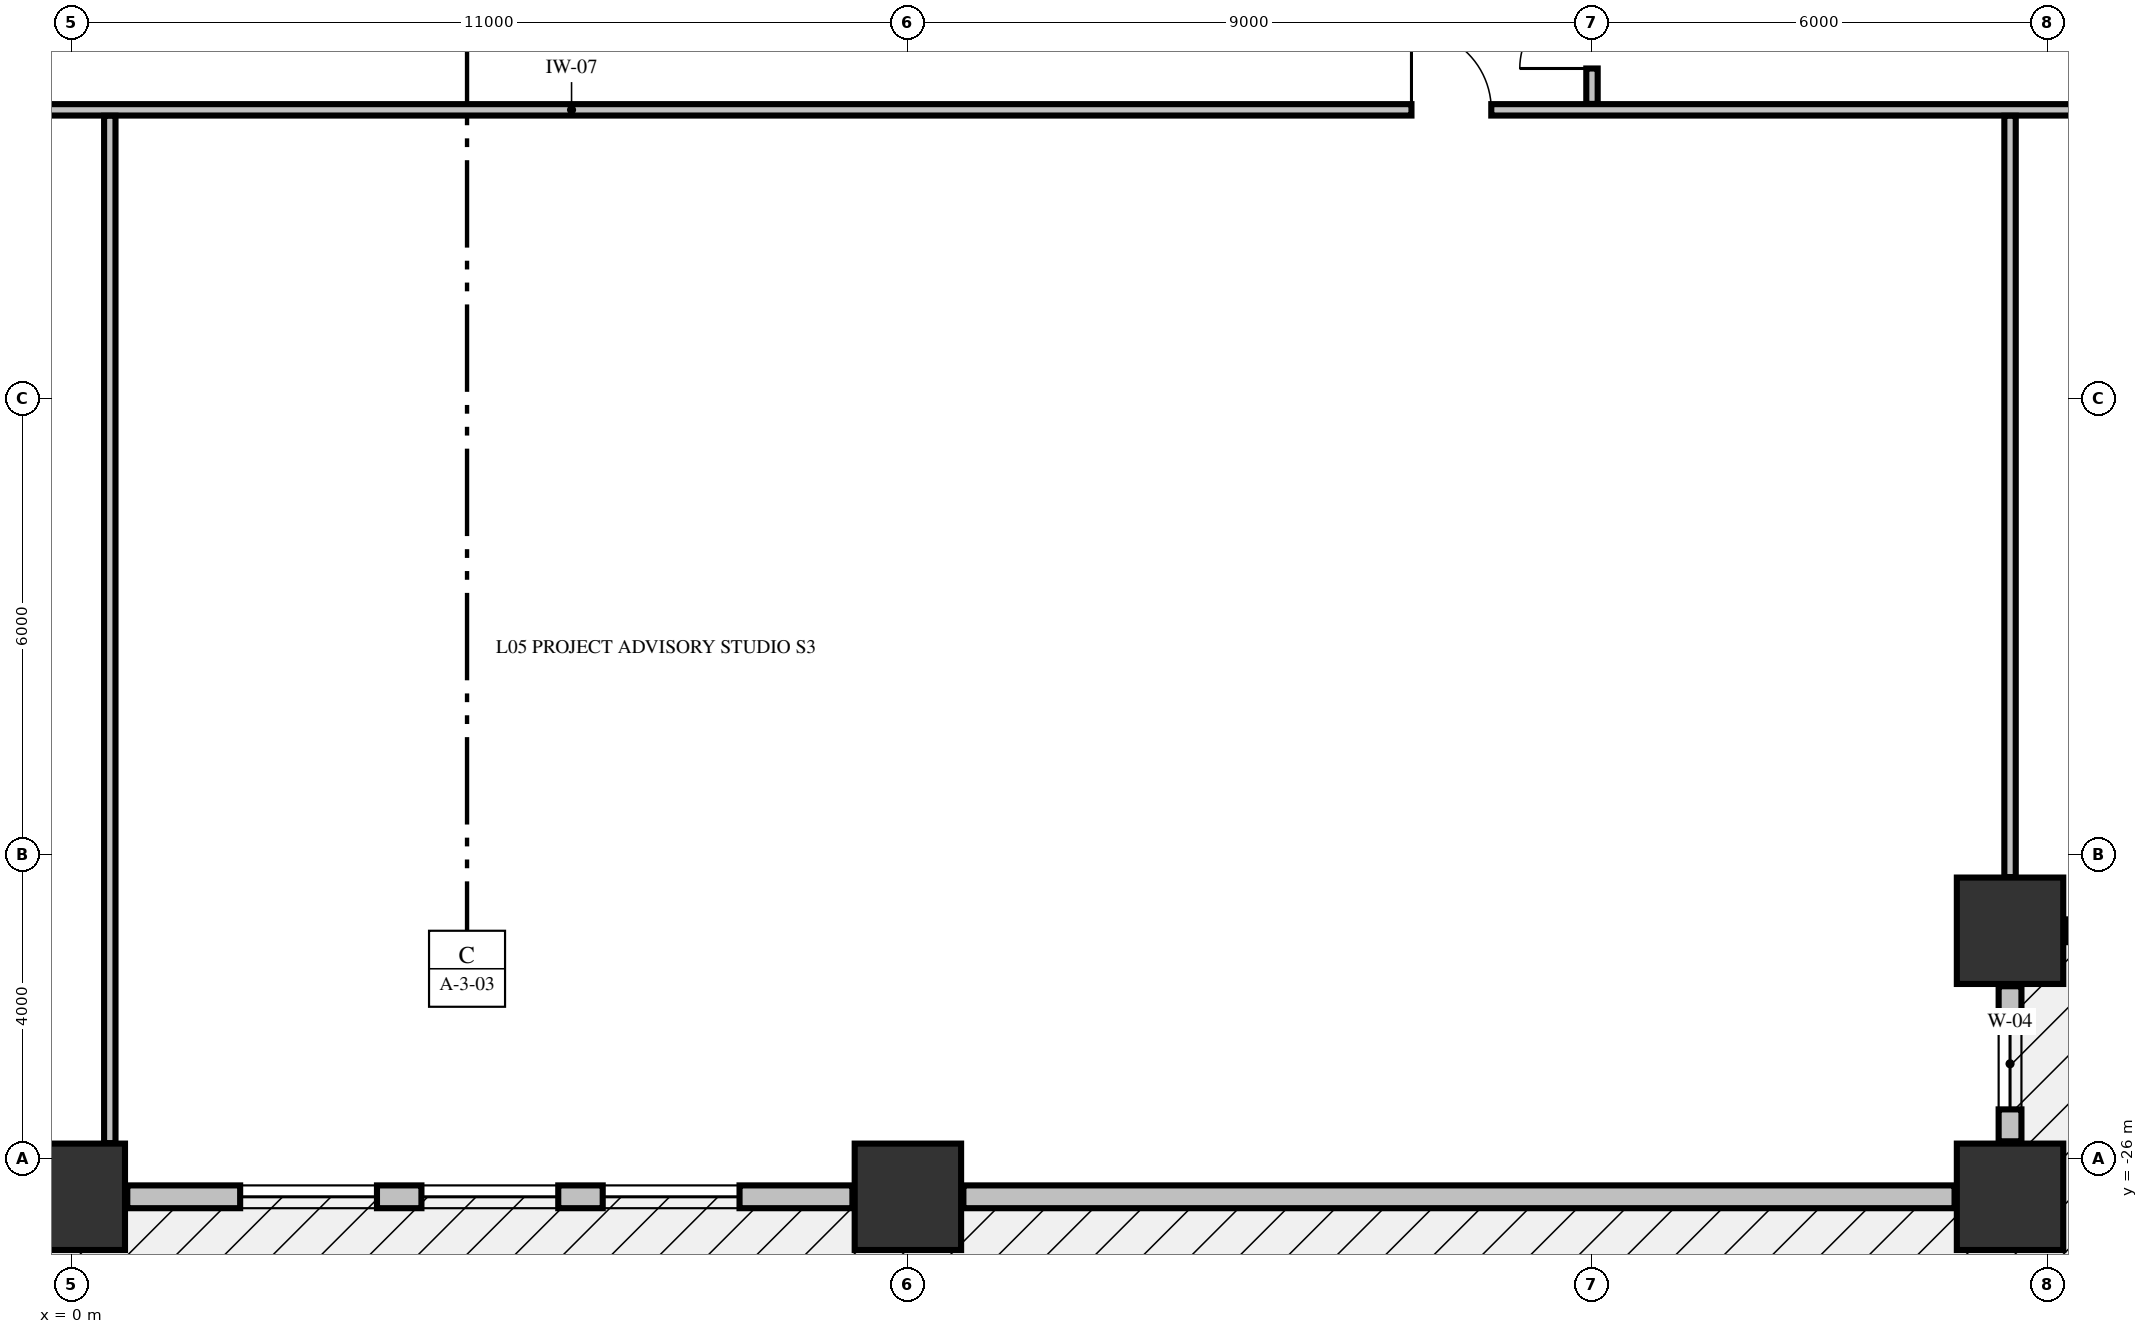
"""IFC4 building model, lengths in metres.
Left out: names, types, materials, properties, quantities, classifications, styles, units other than length and angle.
Written with IfcOpenShell. Run it as: python <this file> out.ifc"""

import sys

from ifc_helpers import new_model, si_unit, direction, frame, frame_2d, origin, origin_2d, place, context, subcontext, project, spatial, rectangle, extrude, element, fill, save


model = new_model("IFC4")
c1 = context("Model", 3, precision=1e-05, world=origin(), true_north=direction((0.0, 1.0)))
c2 = subcontext(c1, "Body", "Model", "MODEL_VIEW")
j1 = project(units=[si_unit("LENGTHUNIT", "METRE"), si_unit("PLANEANGLEUNIT", "RADIAN")], contexts=[c1])
p1 = place(None, origin())
s1 = spatial("IfcSite", under=j1, at=p1, CompositionType="ELEMENT")
p2 = place(p1, origin())
s2 = spatial("IfcBuilding", under=s1, at=p2, CompositionType="ELEMENT")
p3 = place(p2, frame((0.0, 0.0, 27.2)))
s3 = spatial("IfcBuildingStorey", under=s2, at=p3, CompositionType="ELEMENT", Elevation=27.2)
for number, where, z_axis, x_axis in (
    (1, (0.0, -26.5, -0.45), (0.0, 0.0, 1.0), (1.0, 0.0, 0.0)),
    (2, (11.0, -26.5, -0.45), (0.0, 0.0, 1.0), (1.0, 0.0, 0.0)),
    (3, (25.5, -26.5, -0.45), (0.0, 0.0, 1.0), (1.0, 0.0, 0.0)),
    (4, (25.5, -23.0, -0.45), (0.0, 0.0, 1.0), (1.0, 0.0, 0.0)),
):
    element("IfcColumn", number, at=place(p3, frame(where, z_axis=z_axis, x_axis=x_axis)), inside=s3, PredefinedType="COLUMN", context=c2, shape_type="SweptSolid", body=[
        extrude(rectangle(XDim=1.4, YDim=1.4, at=origin_2d()), origin(), (0.0, 0.0, 1.0), 3.77),
    ])
p4 = place(p3, frame((25.5, -25.77, 0.0), z_axis=(0.0, 0.0, 1.0), x_axis=(0.0, 1.0, 0.0)))
e5 = element("IfcWall", 5, at=p4, inside=s3, PredefinedType="STANDARD", context=c2, shape_type="SweptSolid", body=[
    extrude(rectangle(XDim=2.04, YDim=0.3, at=frame_2d((1.02, 0.0))), origin(), (0.0, 0.0, 1.0), 2.712),
])
p5 = place(p4, frame((0.42, 0.0, 0.82)))
e6 = element("IfcOpeningElement", 6, at=p5, cuts=e5, PredefinedType="OPENING", context=c2, shape_type="SweptSolid", body=[
    extrude(rectangle(XDim=1.2, YDim=1.65, at=frame_2d((0.6, 0.825))), frame((0.0, 0.16, 0.0), z_axis=(0.0, -1.0, 0.0), x_axis=(1.0, 0.0, 0.0)), (0.0, 0.0, 1.0), 0.32),
])
p6 = place(p3, frame((26.23, -23.0, 0.0), z_axis=(0.0, 0.0, 1.0), x_axis=(1.0, 0.0, 0.0)))
e7 = element("IfcWall", 7, at=p6, inside=s3, PredefinedType="STANDARD", context=c2, shape_type="SweptSolid", body=[
    extrude(rectangle(XDim=2.04, YDim=0.3, at=frame_2d((1.02, 0.0))), origin(), (0.0, 0.0, 1.0), 2.712),
])
p7 = place(p6, frame((0.42, 0.0, 0.82)))
e8 = element("IfcOpeningElement", 8, at=p7, cuts=e7, PredefinedType="OPENING", context=c2, shape_type="SweptSolid", body=[
    extrude(rectangle(XDim=1.2, YDim=1.65, at=frame_2d((0.6, 0.825))), frame((0.0, 0.16, 0.0), z_axis=(0.0, -1.0, 0.0), x_axis=(1.0, 0.0, 0.0)), (0.0, 0.0, 1.0), 0.32),
])
p8 = place(p3, frame((0.73, -26.5, 0.0), z_axis=(0.0, 0.0, 1.0), x_axis=(1.0, 0.0, 0.0)))
e9 = element("IfcWall", 9, at=p8, inside=s3, PredefinedType="STANDARD", context=c2, shape_type="SweptSolid", body=[
    extrude(rectangle(XDim=9.54, YDim=0.3, at=frame_2d((4.77, 0.0))), origin(), (0.0, 0.0, 1.0), 2.712),
])
p9 = place(p8, frame((1.485, 0.0, 0.78)))
e10 = element("IfcOpeningElement", 10, at=p9, cuts=e9, PredefinedType="OPENING", context=c2, shape_type="SweptSolid", body=[
    extrude(rectangle(XDim=1.8, YDim=1.72, at=frame_2d((0.9, 0.86))), frame((0.0, 0.16, 0.0), z_axis=(0.0, -1.0, 0.0), x_axis=(1.0, 0.0, 0.0)), (0.0, 0.0, 1.0), 0.32),
])
p10 = place(p8, frame((3.87, 0.0, 0.78)))
e11 = element("IfcOpeningElement", 11, at=p10, cuts=e9, PredefinedType="OPENING", context=c2, shape_type="SweptSolid", body=[
    extrude(rectangle(XDim=1.8, YDim=1.72, at=frame_2d((0.9, 0.86))), frame((0.0, 0.16, 0.0), z_axis=(0.0, -1.0, 0.0), x_axis=(1.0, 0.0, 0.0)), (0.0, 0.0, 1.0), 0.32),
])
p11 = place(p8, frame((6.255, 0.0, 0.78)))
e12 = element("IfcOpeningElement", 12, at=p11, cuts=e9, PredefinedType="OPENING", context=c2, shape_type="SweptSolid", body=[
    extrude(rectangle(XDim=1.8, YDim=1.72, at=frame_2d((0.9, 0.86))), frame((0.0, 0.16, 0.0), z_axis=(0.0, -1.0, 0.0), x_axis=(1.0, 0.0, 0.0)), (0.0, 0.0, 1.0), 0.32),
])
p12 = place(p3, frame((11.73, -26.5, 0.0), z_axis=(0.0, 0.0, 1.0), x_axis=(1.0, 0.0, 0.0)))
e13 = element("IfcWall", 13, at=p12, inside=s3, PredefinedType="STANDARD", context=c2, shape_type="SweptSolid", body=[
    extrude(rectangle(XDim=13.04, YDim=0.3, at=frame_2d((6.52, 0.0))), origin(), (0.0, 0.0, 1.0), 2.712),
])
p13 = place(p3, frame((-23.835, -12.2, 0.0), z_axis=(0.0, 0.0, 1.0), x_axis=(1.0, 0.0, 0.0)))
e14 = element("IfcWall", 14, at=p13, inside=s3, PredefinedType="PARTITIONING", context=c2, shape_type="SweptSolid", body=[
    extrude(rectangle(XDim=52.67, YDim=0.15, at=frame_2d((26.335, 0.0))), origin(), (0.0, 0.0, 1.0), 3.32),
])
p14 = place(p13, frame((8.16, 0.0, 0.0)))
e15 = element("IfcOpeningElement", 15, at=p14, cuts=e14, PredefinedType="OPENING", context=c2, shape_type="SweptSolid", body=[
    extrude(rectangle(XDim=1.05, YDim=2.15, at=frame_2d((0.525, 1.075))), frame((0.0, 0.085, 0.0), z_axis=(0.0, -1.0, 0.0), x_axis=(1.0, 0.0, 0.0)), (0.0, 0.0, 1.0), 0.17),
])
p15 = place(p13, frame((18.31, 0.0, 0.0)))
e16 = element("IfcOpeningElement", 16, at=p15, cuts=e14, PredefinedType="OPENING", context=c2, shape_type="SweptSolid", body=[
    extrude(rectangle(XDim=1.05, YDim=2.15, at=frame_2d((0.525, 1.075))), frame((0.0, 0.085, 0.0), z_axis=(0.0, -1.0, 0.0), x_axis=(1.0, 0.0, 0.0)), (0.0, 0.0, 1.0), 0.17),
])
p16 = place(p13, frame((41.46, 0.0, 0.0)))
e17 = element("IfcOpeningElement", 17, at=p16, cuts=e14, PredefinedType="OPENING", context=c2, shape_type="SweptSolid", body=[
    extrude(rectangle(XDim=1.05, YDim=2.15, at=frame_2d((0.525, 1.075))), frame((0.0, 0.085, 0.0), z_axis=(0.0, -1.0, 0.0), x_axis=(1.0, 0.0, 0.0)), (0.0, 0.0, 1.0), 0.17),
])
p17 = place(p3, frame((0.5, -25.794, 0.0), z_axis=(0.0, 0.0, 1.0), x_axis=(0.0, 1.0, 0.0)))
e18 = element("IfcWall", 18, at=p17, inside=s3, PredefinedType="PARTITIONING", context=c2, shape_type="SweptSolid", body=[
    extrude(rectangle(XDim=13.516, YDim=0.15, at=frame_2d((6.758, 0.0))), origin(), (0.0, 0.0, 1.0), 3.32),
])
p18 = place(p3, frame((20.0, -12.122, 0.0), z_axis=(0.0, 0.0, 1.0), x_axis=(0.0, 1.0, 0.0)))
e19 = element("IfcWall", 19, at=p18, inside=s3, PredefinedType="PARTITIONING", context=c2, shape_type="SweptSolid", body=[
    extrude(rectangle(XDim=1.566, YDim=0.15, at=frame_2d((0.783, 0.0))), origin(), (0.0, 0.0, 1.0), 2.66),
])
p19 = place(p18, frame((0.466, 0.0, 0.0)))
e20 = element("IfcOpeningElement", 20, at=p19, cuts=e19, PredefinedType="OPENING", context=c2, shape_type="SweptSolid", body=[
    extrude(rectangle(XDim=0.95, YDim=2.15, at=frame_2d((0.475, 1.075))), frame((0.0, 0.085, 0.0), z_axis=(0.0, -1.0, 0.0), x_axis=(1.0, 0.0, 0.0)), (0.0, 0.0, 1.0), 0.17),
])
p20 = place(p3, frame((25.5, -22.294, 0.0), z_axis=(0.0, 0.0, 1.0), x_axis=(0.0, 1.0, 0.0)))
e21 = element("IfcWall", 21, at=p20, inside=s3, PredefinedType="PARTITIONING", context=c2, shape_type="SweptSolid", body=[
    extrude(rectangle(XDim=10.016, YDim=0.15, at=frame_2d((5.008, 0.0))), origin(), (0.0, 0.0, 1.0), 3.32),
])
p21 = place(p5, origin())
e22 = element("IfcWindow", 22, at=p21, inside=s3, PartitioningType="SINGLE_PANEL", PredefinedType="WINDOW", context=c2, shape_type="SweptSolid", body=[
    extrude(rectangle(XDim=1.2, YDim=1.65, at=frame_2d((0.6, 0.825))), frame((0.0, 0.03, 0.0), z_axis=(0.0, -1.0, 0.0), x_axis=(1.0, 0.0, 0.0)), (0.0, 0.0, 1.0), 0.06),
])
fill(e6, e22)
p22 = place(p9, origin())
e23 = element("IfcWindow", 23, at=p22, inside=s3, PartitioningType="SINGLE_PANEL", PredefinedType="WINDOW", context=c2, shape_type="SweptSolid", body=[
    extrude(rectangle(XDim=1.8, YDim=1.72, at=frame_2d((0.9, 0.86))), frame((0.0, 0.03, 0.0), z_axis=(0.0, -1.0, 0.0), x_axis=(1.0, 0.0, 0.0)), (0.0, 0.0, 1.0), 0.06),
])
fill(e10, e23)
p23 = place(p10, origin())
e24 = element("IfcWindow", 24, at=p23, inside=s3, PartitioningType="SINGLE_PANEL", PredefinedType="WINDOW", context=c2, shape_type="SweptSolid", body=[
    extrude(rectangle(XDim=1.8, YDim=1.72, at=frame_2d((0.9, 0.86))), frame((0.0, 0.03, 0.0), z_axis=(0.0, -1.0, 0.0), x_axis=(1.0, 0.0, 0.0)), (0.0, 0.0, 1.0), 0.06),
])
fill(e11, e24)
p24 = place(p11, origin())
e25 = element("IfcWindow", 25, at=p24, inside=s3, PartitioningType="SINGLE_PANEL", PredefinedType="WINDOW", context=c2, shape_type="SweptSolid", body=[
    extrude(rectangle(XDim=1.8, YDim=1.72, at=frame_2d((0.9, 0.86))), frame((0.0, 0.03, 0.0), z_axis=(0.0, -1.0, 0.0), x_axis=(1.0, 0.0, 0.0)), (0.0, 0.0, 1.0), 0.06),
])
fill(e12, e25)
p25 = place(p16, origin())
e26 = element("IfcDoor", 26, at=p25, inside=s3, OperationType="SINGLE_SWING_LEFT", PredefinedType="DOOR", context=c2, shape_type="SweptSolid", body=[
    extrude(rectangle(XDim=1.05, YDim=2.15, at=frame_2d((0.525, 1.075))), frame((0.0, 0.025, 0.0), z_axis=(0.0, -1.0, 0.0), x_axis=(1.0, 0.0, 0.0)), (0.0, 0.0, 1.0), 0.05),
])
fill(e17, e26)
p26 = place(p19, origin())
e27 = element("IfcDoor", 27, at=p26, inside=s3, OperationType="SINGLE_SWING_LEFT", PredefinedType="DOOR", context=c2, shape_type="SweptSolid", body=[
    extrude(rectangle(XDim=0.95, YDim=2.15, at=frame_2d((0.475, 1.075))), frame((0.0, 0.025, 0.0), z_axis=(0.0, -1.0, 0.0), x_axis=(1.0, 0.0, 0.0)), (0.0, 0.0, 1.0), 0.05),
])
fill(e20, e27)
save(model, sys.argv[1])
